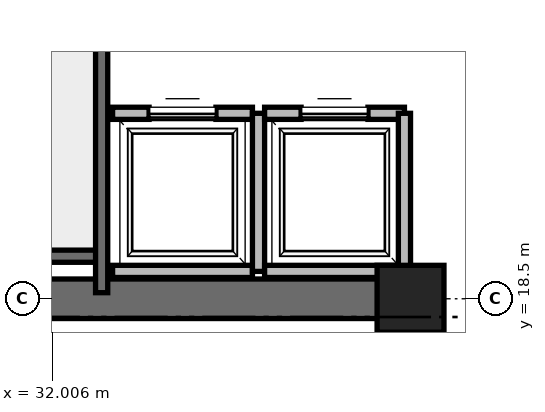
"""IFC4 building model, lengths in metres.
Left out: names, types, materials, properties, quantities, classifications, styles, units other than length and angle.
Written with IfcOpenShell. Run it as: python <this file> out.ifc"""

import sys

from ifc_helpers import new_model, si_unit, direction, frame, frame_2d, origin, origin_2d, place, context, subcontext, project, spatial, rectangle, extrude, element, fill, save


model = new_model("IFC4")
c1 = context("Model", 3, precision=1e-05, world=origin(), true_north=direction((0.0, 1.0)))
c2 = subcontext(c1, "Body", "Model", "MODEL_VIEW")
j1 = project(units=[si_unit("LENGTHUNIT", "METRE"), si_unit("PLANEANGLEUNIT", "RADIAN")], contexts=[c1])
p1 = place(None, origin())
s1 = spatial("IfcSite", under=j1, at=p1, CompositionType="ELEMENT")
p2 = place(p1, origin())
s2 = spatial("IfcBuilding", under=s1, at=p2, CompositionType="ELEMENT")
p3 = place(p2, frame((0.0, 0.0, 99.6)))
s3 = spatial("IfcBuildingStorey", under=s2, at=p3, CompositionType="ELEMENT", Elevation=99.6)
p4 = place(p3, frame((37.9, 18.5, 0.0), z_axis=(0.0, 0.0, 1.0), x_axis=(1.0, 0.0, 0.0)))
e1 = element("IfcColumn", 1, at=p4, inside=s3, PredefinedType="PILASTER", context=c2, shape_type="SweptSolid", body=[
    extrude(rectangle(XDim=1.1, YDim=1.1, at=origin_2d()), origin(), (0.0, 0.0, 1.0), 4.0),
])
p5 = place(p3, frame((29.0, 18.5, 0.0), z_axis=(0.0, 0.0, 1.0), x_axis=(1.0, 0.0, 0.0)))
e2 = element("IfcWall", 2, at=p5, inside=s3, PredefinedType="SHEAR", context=c2, shape_type="SweptSolid", body=[
    extrude(rectangle(XDim=9.2, YDim=0.65, at=frame_2d((4.6, 0.0))), origin(), (0.0, 0.0, 1.0), 3.76),
])
p6 = place(p3, frame((29.7, 19.2, 0.0), z_axis=(0.0, 0.0, 1.0), x_axis=(1.0, 0.0, 0.0)))
e3 = element("IfcWall", 3, at=p6, inside=s3, PredefinedType="SOLIDWALL", context=c2, shape_type="SweptSolid", body=[
    extrude(rectangle(XDim=3.12, YDim=0.2, at=frame_2d((1.56, 0.0))), origin(), (0.0, 0.0, 1.0), 3.76),
])
p7 = place(p3, frame((32.82, 18.6, 0.0), z_axis=(0.0, 0.0, 1.0), x_axis=(0.0, 1.0, 0.0)))
e4 = element("IfcWall", 4, at=p7, inside=s3, PredefinedType="SOLIDWALL", context=c2, shape_type="SweptSolid", body=[
    extrude(rectangle(XDim=8.78, YDim=0.2, at=frame_2d((4.39, 0.0))), origin(), (0.0, 0.0, 1.0), 3.76),
])
p8 = place(p3, frame((33.0, 18.95, 0.0), z_axis=(0.0, 0.0, 1.0), x_axis=(1.0, 0.0, 0.0)))
e5 = element("IfcWall", 5, at=p8, inside=s3, PredefinedType="SOLIDWALL", context=c2, shape_type="SweptSolid", body=[
    extrude(rectangle(XDim=2.3, YDim=0.2, at=frame_2d((1.15, 0.0))), origin(), (0.0, 0.0, 1.0), 3.76),
])
p9 = place(p3, frame((35.3, 21.55, 0.0), z_axis=(0.0, 0.0, 1.0), x_axis=(-1.0, 0.0, 0.0)))
e6 = element("IfcWall", 6, at=p9, inside=s3, PredefinedType="SOLIDWALL", context=c2, shape_type="SweptSolid", body=[
    extrude(rectangle(XDim=2.3, YDim=0.2, at=frame_2d((1.15, 0.0))), origin(), (0.0, 0.0, 1.0), 3.76),
])
p10 = place(p9, frame((0.6, 0.0, 0.0)))
e7 = element("IfcOpeningElement", 7, at=p10, cuts=e6, PredefinedType="OPENING", context=c2, shape_type="SweptSolid", body=[
    extrude(rectangle(XDim=1.1, YDim=2.2, at=frame_2d((0.55, 1.1))), frame((0.0, 0.1, 0.0), z_axis=(0.0, -1.0, 0.0), x_axis=(1.0, 0.0, 0.0)), (0.0, 0.0, 1.0), 0.2),
])
p11 = place(p3, frame((35.4, 18.95, 0.0), z_axis=(0.0, 0.0, 1.0), x_axis=(0.0, 1.0, 0.0)))
e8 = element("IfcWall", 8, at=p11, inside=s3, PredefinedType="SOLIDWALL", context=c2, shape_type="SweptSolid", body=[
    extrude(rectangle(XDim=2.6, YDim=0.2, at=frame_2d((1.3, 0.0))), origin(), (0.0, 0.0, 1.0), 3.76),
])
p12 = place(p3, frame((35.5, 18.95, 0.0), z_axis=(0.0, 0.0, 1.0), x_axis=(1.0, 0.0, 0.0)))
e9 = element("IfcWall", 9, at=p12, inside=s3, PredefinedType="SOLIDWALL", context=c2, shape_type="SweptSolid", body=[
    extrude(rectangle(XDim=2.3, YDim=0.2, at=frame_2d((1.15, 0.0))), origin(), (0.0, 0.0, 1.0), 2.54),
])
p13 = place(p3, frame((37.8, 21.55, 0.0), z_axis=(0.0, 0.0, 1.0), x_axis=(-1.0, 0.0, 0.0)))
e10 = element("IfcWall", 10, at=p13, inside=s3, PredefinedType="SOLIDWALL", context=c2, shape_type="SweptSolid", body=[
    extrude(rectangle(XDim=2.3, YDim=0.2, at=frame_2d((1.15, 0.0))), origin(), (0.0, 0.0, 1.0), 3.76),
])
p14 = place(p13, frame((0.6, 0.0, 0.0)))
e11 = element("IfcOpeningElement", 11, at=p14, cuts=e10, PredefinedType="OPENING", context=c2, shape_type="SweptSolid", body=[
    extrude(rectangle(XDim=1.1, YDim=2.2, at=frame_2d((0.55, 1.1))), frame((0.0, 0.1, 0.0), z_axis=(0.0, -1.0, 0.0), x_axis=(1.0, 0.0, 0.0)), (0.0, 0.0, 1.0), 0.2),
])
p15 = place(p3, frame((37.8, 18.95, 0.0), z_axis=(0.0, 0.0, 1.0), x_axis=(0.0, 1.0, 0.0)))
e12 = element("IfcWall", 12, at=p15, inside=s3, PredefinedType="SOLIDWALL", context=c2, shape_type="SweptSolid", body=[
    extrude(rectangle(XDim=2.6, YDim=0.2, at=frame_2d((1.3, 0.0))), origin(), (0.0, 0.0, 1.0), 2.54),
])
p16 = place(p10, origin())
e13 = element("IfcDoor", 13, at=p16, inside=s3, OperationType="SLIDING_TO_RIGHT", PredefinedType="DOOR", context=c2, shape_type="SweptSolid", body=[
    extrude(rectangle(XDim=1.1, YDim=2.2, at=frame_2d((0.55, 1.1))), frame((0.0, 0.025, 0.0), z_axis=(0.0, -1.0, 0.0), x_axis=(1.0, 0.0, 0.0)), (0.0, 0.0, 1.0), 0.05),
])
fill(e7, e13)
p17 = place(p14, origin())
e14 = element("IfcDoor", 14, at=p17, inside=s3, OperationType="SLIDING_TO_RIGHT", PredefinedType="DOOR", context=c2, shape_type="SweptSolid", body=[
    extrude(rectangle(XDim=1.1, YDim=2.2, at=frame_2d((0.55, 1.1))), frame((0.0, 0.025, 0.0), z_axis=(0.0, -1.0, 0.0), x_axis=(1.0, 0.0, 0.0)), (0.0, 0.0, 1.0), 0.05),
])
fill(e11, e14)
save(model, sys.argv[1])
